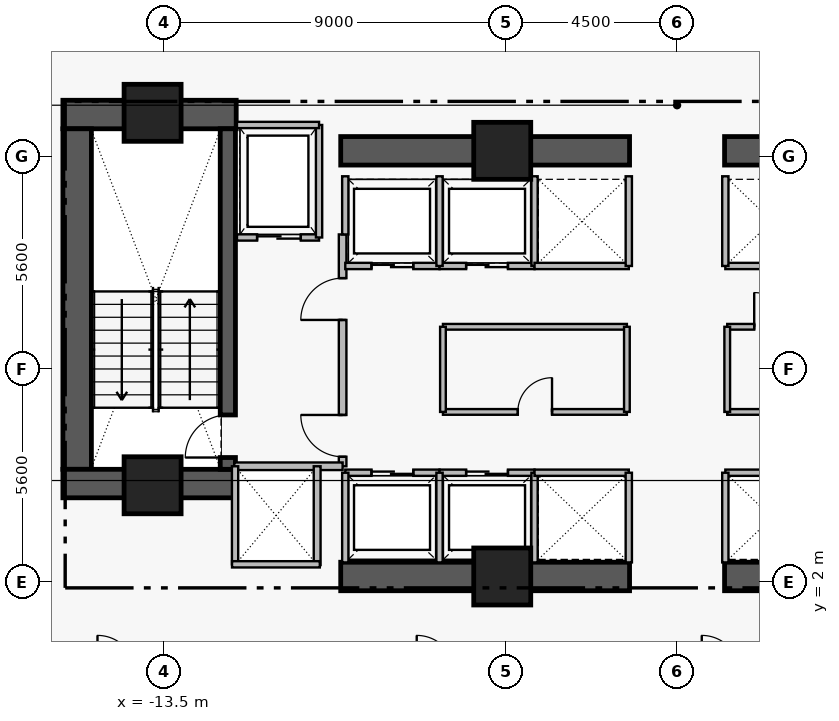
"""IFC4 building model, lengths in metres.
Left out: names, types, materials, properties, quantities, classifications, styles, units other than length and angle.
Written with IfcOpenShell. Run it as: python <this file> out.ifc"""

import sys

from ifc_helpers import new_model, si_unit, direction, frame, frame_2d, origin, origin_2d, place, context, subcontext, project, spatial, rectangle, extrude, element, fill, save


model = new_model("IFC4")
c1 = context("Model", 3, precision=1e-05, world=origin(), true_north=direction((0.0, 1.0)))
c2 = subcontext(c1, "Body", "Model", "MODEL_VIEW")
j1 = project(units=[si_unit("LENGTHUNIT", "METRE"), si_unit("PLANEANGLEUNIT", "RADIAN")], contexts=[c1])
p1 = place(None, origin())
s1 = spatial("IfcSite", under=j1, at=p1, CompositionType="ELEMENT")
p2 = place(p1, origin())
s2 = spatial("IfcBuilding", under=s1, at=p2, CompositionType="ELEMENT")
p3 = place(p2, frame((0.0, 0.0, 99.3)))
s3 = spatial("IfcBuildingStorey", under=s2, at=p3, CompositionType="ELEMENT", Elevation=99.3)
p4 = place(p3, frame((-16.16, 14.305, 0.0), z_axis=(0.0, 0.0, 1.0), x_axis=(1.0, 0.0, 0.0)))
e1 = element("IfcWall", 1, at=p4, inside=s3, PredefinedType="SHEAR", context=c2, shape_type="SweptSolid", body=[
    extrude(rectangle(XDim=4.56, YDim=0.75, at=frame_2d((2.28, 0.0))), origin(), (0.0, 0.0, 1.0), 3.46),
])
p5 = place(p3, frame((-15.785, 4.97, 0.0), z_axis=(0.0, 0.0, 1.0), x_axis=(0.0, 1.0, 0.0)))
e2 = element("IfcWall", 2, at=p5, inside=s3, PredefinedType="SHEAR", context=c2, shape_type="SweptSolid", body=[
    extrude(rectangle(XDim=8.96, YDim=0.75, at=frame_2d((4.48, 0.0))), origin(), (0.0, 0.0, 1.0), 3.46),
])
p6 = place(p3, frame((-16.16, 4.595, 0.0), z_axis=(0.0, 0.0, 1.0), x_axis=(1.0, 0.0, 0.0)))
e3 = element("IfcWall", 3, at=p6, inside=s3, PredefinedType="SHEAR", context=c2, shape_type="SweptSolid", body=[
    extrude(rectangle(XDim=4.56, YDim=0.75, at=frame_2d((2.28, 0.0))), origin(), (0.0, 0.0, 1.0), 3.46),
])
for number, where, z_axis, x_axis in (
    (4, (-8.85, 2.15, 0.0), (0.0, 0.0, 1.0), (1.0, 0.0, 0.0)),
    (5, (1.25, 2.15, 0.0), (0.0, 0.0, 1.0), (1.0, 0.0, 0.0)),
    (6, (-8.85, 13.35, 0.0), (0.0, 0.0, 1.0), (1.0, 0.0, 0.0)),
    (7, (1.25, 13.35, 0.0), (0.0, 0.0, 1.0), (1.0, 0.0, 0.0)),
):
    element("IfcWall", number, at=place(p3, frame(where, z_axis=z_axis, x_axis=x_axis)), inside=s3, PredefinedType="SHEAR", context=c2, shape_type="SweptSolid", body=[
        extrude(rectangle(XDim=7.6, YDim=0.75, at=frame_2d((3.8, 0.0))), origin(), (0.0, 0.0, 1.0), 3.43),
    ])
p7 = place(p3, frame((-11.82, 4.97, 0.0), z_axis=(0.0, 0.0, 1.0), x_axis=(0.0, 1.0, 0.0)))
e8 = element("IfcWall", 8, at=p7, inside=s3, PredefinedType="SHEAR", context=c2, shape_type="SweptSolid", body=[
    extrude(rectangle(XDim=8.96, YDim=0.4, at=frame_2d((4.48, 0.0))), origin(), (0.0, 0.0, 1.0), 3.46),
])
p8 = place(p7, frame((0.31, 0.0, 0.0)))
e9 = element("IfcOpeningElement", 9, at=p8, cuts=e8, PredefinedType="OPENING", context=c2, shape_type="SweptSolid", body=[
    extrude(rectangle(XDim=1.12, YDim=2.22, at=frame_2d((0.56, 1.11))), frame((0.0, 0.21, 0.0), z_axis=(0.0, -1.0, 0.0), x_axis=(1.0, 0.0, 0.0)), (0.0, 0.0, 1.0), 0.42),
])
for number, where, z_axis, x_axis in (
    (10, (-13.8, 14.35, 0.0), (0.0, 0.0, 1.0), (1.0, 0.0, 0.0)),
    (11, (-4.6, 13.35, 0.0), (0.0, 0.0, 1.0), (1.0, 0.0, 0.0)),
    (12, (-13.8, 4.55, 0.0), (0.0, 0.0, 1.0), (1.0, 0.0, 0.0)),
    (13, (-4.6, 2.15, 0.0), (0.0, 0.0, 1.0), (1.0, 0.0, 0.0)),
):
    element("IfcColumn", number, at=place(p3, frame(where, z_axis=z_axis, x_axis=x_axis)), inside=s3, PredefinedType="COLUMN", context=c2, shape_type="SweptSolid", body=[
        extrude(rectangle(XDim=1.5, YDim=1.5, at=origin_2d()), origin(), (0.0, 0.0, 1.0), 3.65),
    ])
p9 = place(p3, frame((-8.8, 5.05, 0.0), z_axis=(0.0, 0.0, 1.0), x_axis=(0.0, 1.0, 0.0)))
e14 = element("IfcWall", 14, at=p9, inside=s3, PredefinedType="PARTITIONING", context=c2, shape_type="SweptSolid", body=[
    extrude(rectangle(XDim=6.1, YDim=0.2, at=frame_2d((3.05, 0.0))), origin(), (0.0, 0.0, 1.0), 3.43),
])
p10 = place(p9, frame((0.25, 0.0, 0.0)))
e15 = element("IfcOpeningElement", 15, at=p10, cuts=e14, PredefinedType="OPENING", context=c2, shape_type="SweptSolid", body=[
    extrude(rectangle(XDim=1.1, YDim=2.2, at=frame_2d((0.55, 1.1))), frame((0.0, 0.11, 0.0), z_axis=(0.0, -1.0, 0.0), x_axis=(1.0, 0.0, 0.0)), (0.0, 0.0, 1.0), 0.22),
])
p11 = place(p9, frame((3.85, 0.0, 0.0)))
e16 = element("IfcOpeningElement", 16, at=p11, cuts=e14, PredefinedType="OPENING", context=c2, shape_type="SweptSolid", body=[
    extrude(rectangle(XDim=1.1, YDim=2.2, at=frame_2d((0.55, 1.1))), frame((0.0, 0.11, 0.0), z_axis=(0.0, -1.0, 0.0), x_axis=(1.0, 0.0, 0.0)), (0.0, 0.0, 1.0), 0.22),
])
p12 = place(p3, frame((-11.58, 11.07, 0.0), z_axis=(0.0, 0.0, 1.0), x_axis=(1.0, 0.0, 0.0)))
e17 = element("IfcWall", 17, at=p12, inside=s3, PredefinedType="PARTITIONING", context=c2, shape_type="SweptSolid", body=[
    extrude(rectangle(XDim=2.16, YDim=0.165, at=frame_2d((1.08, 0.0))), origin(), (0.0, 0.0, 1.0), 3.43),
])
p13 = place(p12, frame((0.53, 0.0, 0.0)))
e18 = element("IfcOpeningElement", 18, at=p13, cuts=e17, PredefinedType="OPENING", context=c2, shape_type="SweptSolid", body=[
    extrude(rectangle(XDim=1.15, YDim=2.25, at=frame_2d((0.575, 1.125))), frame((0.0, 0.093, 0.0), z_axis=(0.0, -1.0, 0.0), x_axis=(1.0, 0.0, 0.0)), (0.0, 0.0, 1.0), 0.185),
])
p14 = place(p3, frame((-8.73, 4.88, 0.0), z_axis=(0.0, 0.0, 1.0), x_axis=(1.0, 0.0, 0.0)))
e19 = element("IfcWall", 19, at=p14, inside=s3, PredefinedType="PARTITIONING", context=c2, shape_type="SweptSolid", body=[
    extrude(rectangle(XDim=2.48, YDim=0.165, at=frame_2d((1.24, 0.0))), origin(), (0.0, 0.0, 1.0), 3.43),
])
p15 = place(p14, frame((0.69, 0.0, 0.0)))
e20 = element("IfcOpeningElement", 20, at=p15, cuts=e19, PredefinedType="OPENING", context=c2, shape_type="SweptSolid", body=[
    extrude(rectangle(XDim=1.1, YDim=2.25, at=frame_2d((0.55, 1.125))), frame((0.0, 0.093, 0.0), z_axis=(0.0, -1.0, 0.0), x_axis=(1.0, 0.0, 0.0)), (0.0, 0.0, 1.0), 0.185),
])
p16 = place(p3, frame((-6.25, 4.88, 0.0), z_axis=(0.0, 0.0, 1.0), x_axis=(1.0, 0.0, 0.0)))
e21 = element("IfcWall", 21, at=p16, inside=s3, PredefinedType="PARTITIONING", context=c2, shape_type="SweptSolid", body=[
    extrude(rectangle(XDim=2.5, YDim=0.165, at=frame_2d((1.25, 0.0))), origin(), (0.0, 0.0, 1.0), 3.43),
])
p17 = place(p16, frame((0.7, 0.0, 0.0)))
e22 = element("IfcOpeningElement", 22, at=p17, cuts=e21, PredefinedType="OPENING", context=c2, shape_type="SweptSolid", body=[
    extrude(rectangle(XDim=1.1, YDim=2.25, at=frame_2d((0.55, 1.125))), frame((0.0, 0.093, 0.0), z_axis=(0.0, -1.0, 0.0), x_axis=(1.0, 0.0, 0.0)), (0.0, 0.0, 1.0), 0.185),
])
p18 = place(p3, frame((-8.73, 10.32, 0.0), z_axis=(0.0, 0.0, 1.0), x_axis=(1.0, 0.0, 0.0)))
e23 = element("IfcWall", 23, at=p18, inside=s3, PredefinedType="PARTITIONING", context=c2, shape_type="SweptSolid", body=[
    extrude(rectangle(XDim=2.48, YDim=0.165, at=frame_2d((1.24, 0.0))), origin(), (0.0, 0.0, 1.0), 3.43),
])
p19 = place(p18, frame((0.69, 0.0, 0.0)))
e24 = element("IfcOpeningElement", 24, at=p19, cuts=e23, PredefinedType="OPENING", context=c2, shape_type="SweptSolid", body=[
    extrude(rectangle(XDim=1.1, YDim=2.25, at=frame_2d((0.55, 1.125))), frame((0.0, 0.093, 0.0), z_axis=(0.0, -1.0, 0.0), x_axis=(1.0, 0.0, 0.0)), (0.0, 0.0, 1.0), 0.185),
])
p20 = place(p3, frame((-6.25, 10.32, 0.0), z_axis=(0.0, 0.0, 1.0), x_axis=(1.0, 0.0, 0.0)))
e25 = element("IfcWall", 25, at=p20, inside=s3, PredefinedType="PARTITIONING", context=c2, shape_type="SweptSolid", body=[
    extrude(rectangle(XDim=2.5, YDim=0.165, at=frame_2d((1.25, 0.0))), origin(), (0.0, 0.0, 1.0), 3.43),
])
p21 = place(p20, frame((0.7, 0.0, 0.0)))
e26 = element("IfcOpeningElement", 26, at=p21, cuts=e25, PredefinedType="OPENING", context=c2, shape_type="SweptSolid", body=[
    extrude(rectangle(XDim=1.1, YDim=2.25, at=frame_2d((0.55, 1.125))), frame((0.0, 0.093, 0.0), z_axis=(0.0, -1.0, 0.0), x_axis=(1.0, 0.0, 0.0)), (0.0, 0.0, 1.0), 0.185),
])
p22 = place(p3, frame((-6.16, 6.48, 0.0), z_axis=(0.0, 0.0, 1.0), x_axis=(1.0, 0.0, 0.0)))
e27 = element("IfcWall", 27, at=p22, inside=s3, PredefinedType="PARTITIONING", context=c2, shape_type="SweptSolid", body=[
    extrude(rectangle(XDim=4.84, YDim=0.15, at=frame_2d((2.42, 0.0))), origin(), (0.0, 0.0, 1.0), 3.43),
])
p23 = place(p22, frame((1.97, 0.0, 0.0)))
e28 = element("IfcOpeningElement", 28, at=p23, cuts=e27, PredefinedType="OPENING", context=c2, shape_type="SweptSolid", body=[
    extrude(rectangle(XDim=0.9, YDim=2.15, at=frame_2d((0.45, 1.075))), frame((0.0, 0.085, 0.0), z_axis=(0.0, -1.0, 0.0), x_axis=(1.0, 0.0, 0.0)), (0.0, 0.0, 1.0), 0.17),
])
p24 = place(p3, frame((1.32, 8.72, 0.0), z_axis=(0.0, 0.0, 1.0), x_axis=(1.0, 0.0, 0.0)))
e29 = element("IfcWall", 29, at=p24, inside=s3, PredefinedType="PARTITIONING", context=c2, shape_type="SweptSolid", body=[
    extrude(rectangle(XDim=2.32, YDim=0.15, at=frame_2d((1.16, 0.0))), origin(), (0.0, 0.0, 1.0), 3.43),
])
p25 = place(p24, frame((0.71, 0.0, 0.0)))
e30 = element("IfcOpeningElement", 30, at=p25, cuts=e29, PredefinedType="OPENING", context=c2, shape_type="SweptSolid", body=[
    extrude(rectangle(XDim=0.9, YDim=2.15, at=frame_2d((0.45, 1.075))), frame((0.0, 0.085, 0.0), z_axis=(0.0, -1.0, 0.0), x_axis=(1.0, 0.0, 0.0)), (0.0, 0.0, 1.0), 0.17),
])
p26 = place(p3, frame((-11.65, 5.05, 0.0), z_axis=(0.0, 0.0, 1.0), x_axis=(1.0, 0.0, 0.0)))
e31 = element("IfcWall", 31, at=p26, inside=s3, PredefinedType="PARTITIONING", context=c2, shape_type="SweptSolid", body=[
    extrude(rectangle(XDim=2.85, YDim=0.2, at=frame_2d((1.425, 0.0))), origin(), (0.0, 0.0, 1.0), 3.43),
])
p27 = place(p3, frame((-9.42, 11.07, 0.0), z_axis=(0.0, 0.0, 1.0), x_axis=(0.0, 1.0, 0.0)))
e32 = element("IfcWall", 32, at=p27, inside=s3, PredefinedType="PARTITIONING", context=c2, shape_type="SweptSolid", body=[
    extrude(rectangle(XDim=2.96, YDim=0.165, at=frame_2d((1.48, 0.0))), origin(), (0.0, 0.0, 1.0), 3.43),
])
p28 = place(p3, frame((-11.58, 14.03, 0.0), z_axis=(0.0, 0.0, 1.0), x_axis=(1.0, 0.0, 0.0)))
e33 = element("IfcWall", 33, at=p28, inside=s3, PredefinedType="PARTITIONING", context=c2, shape_type="SweptSolid", body=[
    extrude(rectangle(XDim=2.16, YDim=0.165, at=frame_2d((1.08, 0.0))), origin(), (0.0, 0.0, 1.0), 3.43),
])
for number, where, z_axis, x_axis in (
    (34, (-8.73, 2.52, 0.0), (0.0, 0.0, 1.0), (0.0, 1.0, 0.0)),
    (35, (-6.25, 2.52, 0.0), (0.0, 0.0, 1.0), (0.0, 1.0, 0.0)),
    (36, (-3.75, 2.52, 0.0), (0.0, 0.0, 1.0), (0.0, 1.0, 0.0)),
):
    element("IfcWall", number, at=place(p3, frame(where, z_axis=z_axis, x_axis=x_axis)), inside=s3, PredefinedType="PARTITIONING", context=c2, shape_type="SweptSolid", body=[
        extrude(rectangle(XDim=2.36, YDim=0.165, at=frame_2d((1.18, 0.0))), origin(), (0.0, 0.0, 1.0), 3.43),
    ])
p29 = place(p3, frame((-8.73, 11.15, 0.0), z_axis=(0.0, 0.0, 1.0), x_axis=(0.0, 1.0, 0.0)))
e37 = element("IfcWall", 37, at=p29, inside=s3, PredefinedType="PARTITIONING", context=c2, shape_type="SweptSolid", body=[
    extrude(rectangle(XDim=1.53, YDim=0.165, at=frame_2d((0.765, 0.0))), origin(), (0.0, 0.0, 1.0), 3.43),
])
for number, where, z_axis, x_axis in (
    (38, (-6.25, 10.32, 0.0), (0.0, 0.0, 1.0), (0.0, 1.0, 0.0)),
    (39, (-3.75, 10.32, 0.0), (0.0, 0.0, 1.0), (0.0, 1.0, 0.0)),
):
    element("IfcWall", number, at=place(p3, frame(where, z_axis=z_axis, x_axis=x_axis)), inside=s3, PredefinedType="PARTITIONING", context=c2, shape_type="SweptSolid", body=[
        extrude(rectangle(XDim=2.36, YDim=0.165, at=frame_2d((1.18, 0.0))), origin(), (0.0, 0.0, 1.0), 3.43),
    ])
p30 = place(p3, frame((-3.75, 4.88, 0.0), z_axis=(0.0, 0.0, 1.0), x_axis=(1.0, 0.0, 0.0)))
e40 = element("IfcWall", 40, at=p30, inside=s3, PredefinedType="PARTITIONING", context=c2, shape_type="SweptSolid", body=[
    extrude(rectangle(XDim=2.48, YDim=0.165, at=frame_2d((1.24, 0.0))), origin(), (0.0, 0.0, 1.0), 3.43),
])
p31 = place(p3, frame((-1.27, 2.52, 0.0), z_axis=(0.0, 0.0, 1.0), x_axis=(0.0, 1.0, 0.0)))
e41 = element("IfcWall", 41, at=p31, inside=s3, PredefinedType="PARTITIONING", context=c2, shape_type="SweptSolid", body=[
    extrude(rectangle(XDim=2.36, YDim=0.165, at=frame_2d((1.18, 0.0))), origin(), (0.0, 0.0, 1.0), 3.43),
])
p32 = place(p3, frame((1.27, 4.88, 0.0), z_axis=(0.0, 0.0, 1.0), x_axis=(1.0, 0.0, 0.0)))
e42 = element("IfcWall", 42, at=p32, inside=s3, PredefinedType="PARTITIONING", context=c2, shape_type="SweptSolid", body=[
    extrude(rectangle(XDim=2.48, YDim=0.165, at=frame_2d((1.24, 0.0))), origin(), (0.0, 0.0, 1.0), 3.43),
])
p33 = place(p3, frame((1.27, 2.52, 0.0), z_axis=(0.0, 0.0, 1.0), x_axis=(0.0, 1.0, 0.0)))
e43 = element("IfcWall", 43, at=p33, inside=s3, PredefinedType="PARTITIONING", context=c2, shape_type="SweptSolid", body=[
    extrude(rectangle(XDim=2.36, YDim=0.165, at=frame_2d((1.18, 0.0))), origin(), (0.0, 0.0, 1.0), 3.43),
])
p34 = place(p3, frame((-3.75, 10.32, 0.0), z_axis=(0.0, 0.0, 1.0), x_axis=(1.0, 0.0, 0.0)))
e44 = element("IfcWall", 44, at=p34, inside=s3, PredefinedType="PARTITIONING", context=c2, shape_type="SweptSolid", body=[
    extrude(rectangle(XDim=2.48, YDim=0.165, at=frame_2d((1.24, 0.0))), origin(), (0.0, 0.0, 1.0), 3.43),
])
p35 = place(p3, frame((-1.27, 10.32, 0.0), z_axis=(0.0, 0.0, 1.0), x_axis=(0.0, 1.0, 0.0)))
e45 = element("IfcWall", 45, at=p35, inside=s3, PredefinedType="PARTITIONING", context=c2, shape_type="SweptSolid", body=[
    extrude(rectangle(XDim=2.36, YDim=0.165, at=frame_2d((1.18, 0.0))), origin(), (0.0, 0.0, 1.0), 3.43),
])
p36 = place(p3, frame((1.27, 10.32, 0.0), z_axis=(0.0, 0.0, 1.0), x_axis=(1.0, 0.0, 0.0)))
e46 = element("IfcWall", 46, at=p36, inside=s3, PredefinedType="PARTITIONING", context=c2, shape_type="SweptSolid", body=[
    extrude(rectangle(XDim=2.48, YDim=0.165, at=frame_2d((1.24, 0.0))), origin(), (0.0, 0.0, 1.0), 3.43),
])
p37 = place(p3, frame((1.27, 10.32, 0.0), z_axis=(0.0, 0.0, 1.0), x_axis=(0.0, 1.0, 0.0)))
e47 = element("IfcWall", 47, at=p37, inside=s3, PredefinedType="PARTITIONING", context=c2, shape_type="SweptSolid", body=[
    extrude(rectangle(XDim=2.36, YDim=0.165, at=frame_2d((1.18, 0.0))), origin(), (0.0, 0.0, 1.0), 3.43),
])
p38 = place(p3, frame((-9.47, 2.45, 0.0), z_axis=(0.0, 0.0, 1.0), x_axis=(0.0, 1.0, 0.0)))
e48 = element("IfcWall", 48, at=p38, inside=s3, PredefinedType="PARTITIONING", context=c2, shape_type="SweptSolid", body=[
    extrude(rectangle(XDim=2.6, YDim=0.18, at=frame_2d((1.3, 0.0))), origin(), (0.0, 0.0, 1.0), 3.43),
])
p39 = place(p3, frame((-11.63, 2.47, 0.0), z_axis=(0.0, 0.0, 1.0), x_axis=(0.0, 1.0, 0.0)))
e49 = element("IfcWall", 49, at=p39, inside=s3, PredefinedType="PARTITIONING", context=c2, shape_type="SweptSolid", body=[
    extrude(rectangle(XDim=2.58, YDim=0.165, at=frame_2d((1.29, 0.0))), origin(), (0.0, 0.0, 1.0), 3.43),
])
p40 = place(p3, frame((-11.71, 2.47, 0.0), z_axis=(0.0, 0.0, 1.0), x_axis=(1.0, 0.0, 0.0)))
e50 = element("IfcWall", 50, at=p40, inside=s3, PredefinedType="PARTITIONING", context=c2, shape_type="SweptSolid", body=[
    extrude(rectangle(XDim=2.31, YDim=0.165, at=frame_2d((1.155, 0.0))), origin(), (0.0, 0.0, 1.0), 2.03),
])
p41 = place(p3, frame((-6.16, 8.72, 0.0), z_axis=(0.0, 0.0, 1.0), x_axis=(1.0, 0.0, 0.0)))
e51 = element("IfcWall", 51, at=p41, inside=s3, PredefinedType="PARTITIONING", context=c2, shape_type="SweptSolid", body=[
    extrude(rectangle(XDim=4.84, YDim=0.15, at=frame_2d((2.42, 0.0))), origin(), (0.0, 0.0, 1.0), 3.43),
])
for number, where, z_axis, x_axis in (
    (52, (-6.16, 6.48, 0.0), (0.0, 0.0, 1.0), (0.0, 1.0, 0.0)),
    (53, (-1.32, 6.48, 0.0), (0.0, 0.0, 1.0), (0.0, 1.0, 0.0)),
):
    element("IfcWall", number, at=place(p3, frame(where, z_axis=z_axis, x_axis=x_axis)), inside=s3, PredefinedType="PARTITIONING", context=c2, shape_type="SweptSolid", body=[
        extrude(rectangle(XDim=2.24, YDim=0.15, at=frame_2d((1.12, 0.0))), origin(), (0.0, 0.0, 1.0), 3.43),
    ])
p42 = place(p3, frame((1.32, 6.48, 0.0), z_axis=(0.0, 0.0, 1.0), x_axis=(1.0, 0.0, 0.0)))
e54 = element("IfcWall", 54, at=p42, inside=s3, PredefinedType="PARTITIONING", context=c2, shape_type="SweptSolid", body=[
    extrude(rectangle(XDim=2.32, YDim=0.15, at=frame_2d((1.16, 0.0))), origin(), (0.0, 0.0, 1.0), 3.43),
])
p43 = place(p3, frame((1.32, 6.48, 0.0), z_axis=(0.0, 0.0, 1.0), x_axis=(0.0, 1.0, 0.0)))
e55 = element("IfcWall", 55, at=p43, inside=s3, PredefinedType="PARTITIONING", context=c2, shape_type="SweptSolid", body=[
    extrude(rectangle(XDim=2.24, YDim=0.15, at=frame_2d((1.12, 0.0))), origin(), (0.0, 0.0, 1.0), 3.43),
])
p44 = place(p8, origin())
e56 = element("IfcDoor", 56, at=p44, inside=s3, OperationType="SINGLE_SWING_LEFT", PredefinedType="DOOR", context=c2, shape_type="SweptSolid", body=[
    extrude(rectangle(XDim=1.12, YDim=2.22, at=frame_2d((0.56, 1.11))), frame((0.0, 0.025, 0.0), z_axis=(0.0, -1.0, 0.0), x_axis=(1.0, 0.0, 0.0)), (0.0, 0.0, 1.0), 0.05),
])
fill(e9, e56)
p45 = place(p10, origin())
e57 = element("IfcDoor", 57, at=p45, inside=s3, OperationType="SINGLE_SWING_RIGHT", PredefinedType="DOOR", context=c2, shape_type="SweptSolid", body=[
    extrude(rectangle(XDim=1.1, YDim=2.2, at=frame_2d((0.55, 1.1))), frame((0.0, 0.025, 0.0), z_axis=(0.0, -1.0, 0.0), x_axis=(1.0, 0.0, 0.0)), (0.0, 0.0, 1.0), 0.05),
])
fill(e15, e57)
p46 = place(p11, origin())
e58 = element("IfcDoor", 58, at=p46, inside=s3, OperationType="SINGLE_SWING_LEFT", PredefinedType="DOOR", context=c2, shape_type="SweptSolid", body=[
    extrude(rectangle(XDim=1.1, YDim=2.2, at=frame_2d((0.55, 1.1))), frame((0.0, 0.025, 0.0), z_axis=(0.0, -1.0, 0.0), x_axis=(1.0, 0.0, 0.0)), (0.0, 0.0, 1.0), 0.05),
])
fill(e16, e58)
p47 = place(p13, origin())
e59 = element("IfcDoor", 59, at=p47, inside=s3, OperationType="SLIDING_TO_LEFT", PredefinedType="DOOR", context=c2, shape_type="SweptSolid", body=[
    extrude(rectangle(XDim=1.15, YDim=2.25, at=frame_2d((0.575, 1.125))), frame((0.0, 0.025, 0.0), z_axis=(0.0, -1.0, 0.0), x_axis=(1.0, 0.0, 0.0)), (0.0, 0.0, 1.0), 0.05),
])
fill(e18, e59)
p48 = place(p15, origin())
e60 = element("IfcDoor", 60, at=p48, inside=s3, OperationType="SLIDING_TO_LEFT", PredefinedType="DOOR", context=c2, shape_type="SweptSolid", body=[
    extrude(rectangle(XDim=1.1, YDim=2.25, at=frame_2d((0.55, 1.125))), frame((0.0, 0.025, 0.0), z_axis=(0.0, -1.0, 0.0), x_axis=(1.0, 0.0, 0.0)), (0.0, 0.0, 1.0), 0.05),
])
fill(e20, e60)
p49 = place(p17, origin())
e61 = element("IfcDoor", 61, at=p49, inside=s3, OperationType="SLIDING_TO_LEFT", PredefinedType="DOOR", context=c2, shape_type="SweptSolid", body=[
    extrude(rectangle(XDim=1.1, YDim=2.25, at=frame_2d((0.55, 1.125))), frame((0.0, 0.025, 0.0), z_axis=(0.0, -1.0, 0.0), x_axis=(1.0, 0.0, 0.0)), (0.0, 0.0, 1.0), 0.05),
])
fill(e22, e61)
p50 = place(p19, origin())
e62 = element("IfcDoor", 62, at=p50, inside=s3, OperationType="SLIDING_TO_LEFT", PredefinedType="DOOR", context=c2, shape_type="SweptSolid", body=[
    extrude(rectangle(XDim=1.1, YDim=2.25, at=frame_2d((0.55, 1.125))), frame((0.0, 0.025, 0.0), z_axis=(0.0, -1.0, 0.0), x_axis=(1.0, 0.0, 0.0)), (0.0, 0.0, 1.0), 0.05),
])
fill(e24, e62)
p51 = place(p21, origin())
e63 = element("IfcDoor", 63, at=p51, inside=s3, OperationType="SLIDING_TO_LEFT", PredefinedType="DOOR", context=c2, shape_type="SweptSolid", body=[
    extrude(rectangle(XDim=1.1, YDim=2.25, at=frame_2d((0.55, 1.125))), frame((0.0, 0.025, 0.0), z_axis=(0.0, -1.0, 0.0), x_axis=(1.0, 0.0, 0.0)), (0.0, 0.0, 1.0), 0.05),
])
fill(e26, e63)
p52 = place(p23, origin())
e64 = element("IfcDoor", 64, at=p52, inside=s3, OperationType="SINGLE_SWING_RIGHT", PredefinedType="DOOR", context=c2, shape_type="SweptSolid", body=[
    extrude(rectangle(XDim=0.9, YDim=2.15, at=frame_2d((0.45, 1.075))), frame((0.0, 0.025, 0.0), z_axis=(0.0, -1.0, 0.0), x_axis=(1.0, 0.0, 0.0)), (0.0, 0.0, 1.0), 0.05),
])
fill(e28, e64)
p53 = place(p25, origin())
e65 = element("IfcDoor", 65, at=p53, inside=s3, OperationType="SINGLE_SWING_LEFT", PredefinedType="DOOR", context=c2, shape_type="SweptSolid", body=[
    extrude(rectangle(XDim=0.9, YDim=2.15, at=frame_2d((0.45, 1.075))), frame((0.0, 0.025, 0.0), z_axis=(0.0, -1.0, 0.0), x_axis=(1.0, 0.0, 0.0)), (0.0, 0.0, 1.0), 0.05),
])
fill(e30, e65)
save(model, sys.argv[1])
